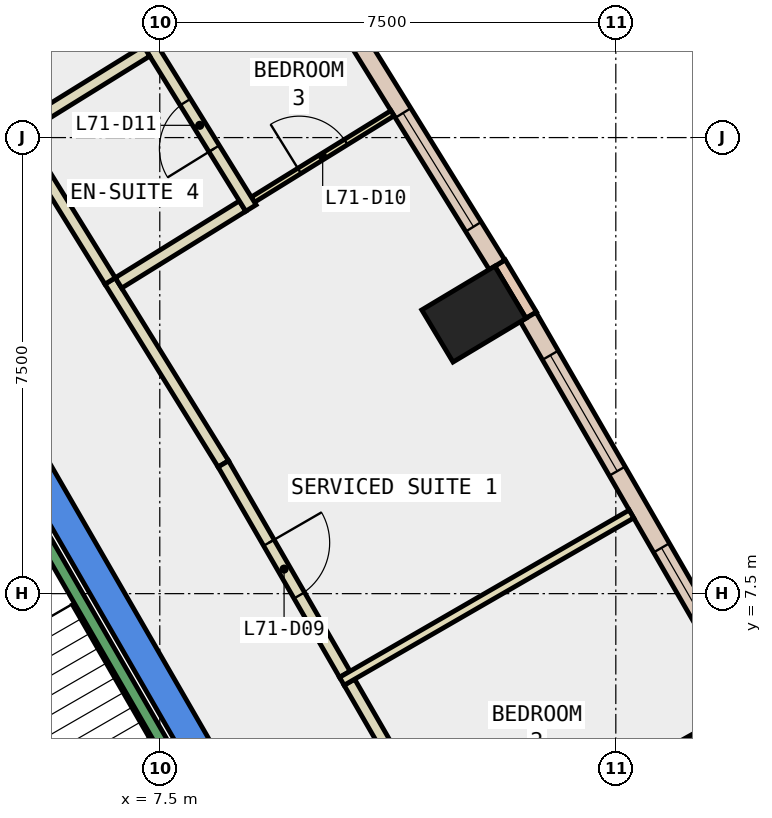
"""IFC4 building model, lengths in metres.
Left out: names, types, materials, properties, quantities, classifications, styles, units other than length and angle.
Written with IfcOpenShell. Run it as: python <this file> out.ifc"""

import sys

from ifc_helpers import new_model, si_unit, direction, frame, frame_2d, origin, origin_2d, place, context, subcontext, project, spatial, polyline, rectangle, outline, extrude, element, fill, save


model = new_model("IFC4")
c1 = context("Model", 3, precision=1e-05, world=origin(), true_north=direction((0.0, 1.0)))
c2 = subcontext(c1, "Body", "Model", "MODEL_VIEW")
j1 = project(units=[si_unit("LENGTHUNIT", "METRE"), si_unit("PLANEANGLEUNIT", "RADIAN")], contexts=[c1])
p1 = place(None, origin())
s1 = spatial("IfcSite", under=j1, at=p1, CompositionType="ELEMENT")
p2 = place(p1, origin())
s2 = spatial("IfcBuilding", under=s1, at=p2, CompositionType="ELEMENT")
p3 = place(p2, frame((0.0, 0.0, 304.4)))
s3 = spatial("IfcBuildingStorey", under=s2, at=p3, CompositionType="ELEMENT", Elevation=304.4)
for number, where, z_axis, x_axis in (
    (1, (16.809, 4.921, -0.34), (0.0, 0.0, 1.0), (-0.486, 0.874, 0.0)),
    (2, (12.666, 12.097, -0.34), (0.0, 0.0, 1.0), (-0.514, 0.858, 0.0)),
):
    element("IfcColumn", number, at=place(p3, frame(where, z_axis=z_axis, x_axis=x_axis)), inside=s3, PredefinedType="COLUMN", context=c2, shape_type="SweptSolid", body=[
        extrude(rectangle(XDim=1.0, YDim=1.4, at=origin_2d()), origin(), (0.0, 0.0, 1.0), 3.6),
    ])
p4 = place(p3, frame((0.0, 0.0, -0.34)))
e3 = element("IfcWall", 3, at=p4, inside=s3, PredefinedType="SHEAR", context=c2, shape_type="SweptSolid", body=[
    extrude(outline(polyline([(5.486, 9.998), (5.053, 9.748), (9.238, 2.5), (9.815, 2.5), (5.486, 9.998)])), origin(), (0.0, 0.0, 1.0), 3.6),
])
p5 = place(p3, frame((13.609, 12.08, 0.0), z_axis=(0.0, 0.0, 1.0), x_axis=(-0.513885310016, 0.857858897576, 0.0)))
e4 = element("IfcWall", 4, at=p5, inside=s3, PredefinedType="STANDARD", context=c2, shape_type="SweptSolid", body=[
    extrude(rectangle(XDim=1.0, YDim=0.2, at=frame_2d((0.5, 0.0))), origin(), (0.0, 0.0, 1.0), 3.26),
])
p6 = place(p3, frame((17.215, 5.717, 0.0), z_axis=(0.0, 0.0, 1.0), x_axis=(-0.499905472729, 0.866079972252, 0.0)))
e5 = element("IfcWall", 5, at=p6, inside=s3, PredefinedType="STANDARD", context=c2, shape_type="SweptSolid", body=[
    extrude(rectangle(XDim=7.313, YDim=0.3, at=frame_2d((3.657, 0.0))), origin(), (0.0, 0.0, 1.0), 3.26),
])
p7 = place(p6, frame((0.728, 0.0, 0.9)))
e6 = element("IfcOpeningElement", 6, at=p7, cuts=e5, PredefinedType="OPENING", context=c2, shape_type="SweptSolid", body=[
    extrude(rectangle(XDim=2.2, YDim=2.0, at=frame_2d((1.1, 1.0))), frame((0.0, 0.16, 0.0), z_axis=(0.0, -1.0, 0.0), x_axis=(1.0, 0.0, 0.0)), (0.0, 0.0, 1.0), 0.32),
])
p8 = place(p6, frame((4.385, 0.0, 0.9)))
e7 = element("IfcOpeningElement", 7, at=p8, cuts=e5, PredefinedType="OPENING", context=c2, shape_type="SweptSolid", body=[
    extrude(rectangle(XDim=2.2, YDim=2.0, at=frame_2d((1.1, 1.0))), frame((0.0, 0.16, 0.0), z_axis=(0.0, -1.0, 0.0), x_axis=(1.0, 0.0, 0.0)), (0.0, 0.0, 1.0), 0.32),
])
p9 = place(p3, frame((13.047, 12.907, 0.0), z_axis=(0.0, 0.0, 1.0), x_axis=(-0.526409529565, 0.850231149267, 0.0)))
e8 = element("IfcWall", 8, at=p9, inside=s3, PredefinedType="STANDARD", context=c2, shape_type="SweptSolid", body=[
    extrude(rectangle(XDim=7.346, YDim=0.3, at=frame_2d((3.673, 0.0))), origin(), (0.0, 0.0, 1.0), 3.26),
])
p10 = place(p9, frame((0.737, 0.0, 0.9)))
e9 = element("IfcOpeningElement", 9, at=p10, cuts=e8, PredefinedType="OPENING", context=c2, shape_type="SweptSolid", body=[
    extrude(rectangle(XDim=2.2, YDim=2.0, at=frame_2d((1.1, 1.0))), frame((0.0, 0.16, 0.0), z_axis=(0.0, -1.0, 0.0), x_axis=(1.0, 0.0, 0.0)), (0.0, 0.0, 1.0), 0.32),
])
p11 = place(p9, frame((4.41, 0.0, 0.9)))
e10 = element("IfcOpeningElement", 10, at=p11, cuts=e8, PredefinedType="OPENING", context=c2, shape_type="SweptSolid", body=[
    extrude(rectangle(XDim=2.2, YDim=2.0, at=frame_2d((1.1, 1.0))), frame((0.0, 0.16, 0.0), z_axis=(0.0, -1.0, 0.0), x_axis=(1.0, 0.0, 0.0)), (0.0, 0.0, 1.0), 0.32),
])
p12 = place(p3, frame((10.618, 6.044, 0.0), z_axis=(0.0, 0.0, 1.0), x_axis=(0.50008212199, -0.86597798544, 0.0)))
e11 = element("IfcWall", 11, at=p12, inside=s3, PredefinedType="PARTITIONING", context=c2, shape_type="SweptSolid", body=[
    extrude(rectangle(XDim=3.995, YDim=0.2, at=frame_2d((1.998, 0.0))), origin(), (0.0, 0.0, 1.0), 3.26),
])
p13 = place(p3, frame((6.683, 12.642, 0.0), z_axis=(0.0, 0.0, 1.0), x_axis=(0.526290465295, -0.850304854825, 0.0)))
e12 = element("IfcWall", 12, at=p13, inside=s3, PredefinedType="PARTITIONING", context=c2, shape_type="SweptSolid", body=[
    extrude(rectangle(XDim=3.538, YDim=0.2, at=frame_2d((1.769, 0.0))), origin(), (0.0, 0.0, 1.0), 3.26),
])
p14 = place(p3, frame((8.545, 9.634, 0.0), z_axis=(0.0, 0.0, 1.0), x_axis=(0.50008212199, -0.86597798544, 0.0)))
e13 = element("IfcWall", 13, at=p14, inside=s3, PredefinedType="PARTITIONING", context=c2, shape_type="SweptSolid", body=[
    extrude(rectangle(XDim=3.995, YDim=0.2, at=frame_2d((1.998, 0.0))), origin(), (0.0, 0.0, 1.0), 3.26),
])
p15 = place(p14, frame((1.498, 0.0, 0.0)))
e14 = element("IfcOpeningElement", 14, at=p15, cuts=e13, PredefinedType="OPENING", context=c2, shape_type="SweptSolid", body=[
    extrude(rectangle(XDim=1.0, YDim=2.1, at=frame_2d((0.5, 1.05))), frame((0.0, 0.11, 0.0), z_axis=(0.0, -1.0, 0.0), x_axis=(1.0, 0.0, 0.0)), (0.0, 0.0, 1.0), 0.22),
])
p16 = place(p3, frame((5.104, 15.193, 0.0), z_axis=(0.0, 0.0, 1.0), x_axis=(0.526329401671, -0.850280754184, 0.0)))
e15 = element("IfcWall", 15, at=p16, inside=s3, PredefinedType="PARTITIONING", context=c2, shape_type="SweptSolid", body=[
    extrude(rectangle(XDim=3.0, YDim=0.2, at=frame_2d((1.5, 0.0))), origin(), (0.0, 0.0, 1.0), 3.26),
])
p17 = place(p3, frame((10.494, 6.059, 0.0), z_axis=(0.0, 0.0, 1.0), x_axis=(0.866027397988, 0.499996545922, 0.0)))
e16 = element("IfcWall", 16, at=p17, inside=s3, PredefinedType="PARTITIONING", context=c2, shape_type="SweptSolid", body=[
    extrude(rectangle(XDim=5.5, YDim=0.15, at=frame_2d((2.75, 0.0))), origin(), (0.0, 0.0, 1.0), 3.26),
])
p18 = place(p3, frame((9.031, 13.979, 0.0), z_axis=(0.0, 0.0, 1.0), x_axis=(0.85032680557, 0.526254998768, 0.0)))
e17 = element("IfcWall", 17, at=p18, inside=s3, PredefinedType="PARTITIONING", context=c2, shape_type="SweptSolid", body=[
    extrude(rectangle(XDim=2.7, YDim=0.1, at=frame_2d((1.35, 0.0))), origin(), (0.0, 0.0, 1.0), 3.26),
])
p19 = place(p18, frame((0.9, 0.0, 0.0)))
e18 = element("IfcOpeningElement", 18, at=p19, cuts=e17, PredefinedType="OPENING", context=c2, shape_type="SweptSolid", body=[
    extrude(rectangle(XDim=0.9, YDim=2.1, at=frame_2d((0.45, 1.05))), frame((0.0, 0.06, 0.0), z_axis=(0.0, -1.0, 0.0), x_axis=(1.0, 0.0, 0.0)), (0.0, 0.0, 1.0), 0.12),
])
p20 = place(p3, frame((6.821, 12.61, 0.0), z_axis=(0.0, 0.0, 1.0), x_axis=(0.850254303895, 0.526372129494, 0.0)))
e19 = element("IfcWall", 19, at=p20, inside=s3, PredefinedType="PARTITIONING", context=c2, shape_type="SweptSolid", body=[
    extrude(rectangle(XDim=2.399, YDim=0.2, at=frame_2d((1.2, 0.0))), origin(), (0.0, 0.0, 1.0), 3.26),
])
p21 = place(p3, frame((8.999, 13.841, 0.0), z_axis=(0.0, 0.0, 1.0), x_axis=(-0.526283695852, 0.850309044689, 0.0)))
e20 = element("IfcWall", 20, at=p21, inside=s3, PredefinedType="PARTITIONING", context=c2, shape_type="SweptSolid", body=[
    extrude(rectangle(XDim=3.2, YDim=0.2, at=frame_2d((1.6, 0.0))), origin(), (0.0, 0.0, 1.0), 3.26),
])
p22 = place(p21, frame((1.15, 0.0, 0.0)))
e21 = element("IfcOpeningElement", 21, at=p22, cuts=e20, PredefinedType="OPENING", context=c2, shape_type="SweptSolid", body=[
    extrude(rectangle(XDim=0.9, YDim=2.1, at=frame_2d((0.45, 1.05))), frame((0.0, 0.11, 0.0), z_axis=(0.0, -1.0, 0.0), x_axis=(1.0, 0.0, 0.0)), (0.0, 0.0, 1.0), 0.22),
])
p23 = place(p3, frame((7.282, 16.424, 0.0), z_axis=(0.0, 0.0, 1.0), x_axis=(-0.850142312258, -0.526552987751, 0.0)))
e22 = element("IfcWall", 22, at=p23, inside=s3, PredefinedType="PARTITIONING", context=c2, shape_type="SweptSolid", body=[
    extrude(rectangle(XDim=2.5, YDim=0.2, at=frame_2d((1.25, 0.0))), origin(), (0.0, 0.0, 1.0), 3.26),
])
p24 = place(p3, frame((4.445, 16.068, 0.0), z_axis=(0.0, 0.0, 1.0), x_axis=(0.785872006963, 0.618389188677, 0.0)))
e23 = element("IfcWall", 23, at=p24, inside=s3, PredefinedType="PARTITIONING", context=c2, shape_type="SweptSolid", body=[
    extrude(rectangle(XDim=4.216, YDim=0.15, at=frame_2d((2.108, 0.0))), origin(), (0.0, 0.0, 1.0), 3.26),
])
p25 = place(p3, frame((8.48, 3.412, 0.0), z_axis=(0.0, 0.0, 1.0), x_axis=(-0.499978703459, 0.866037698999, 0.0)))
e24 = element("IfcWall", 24, at=p25, inside=s3, PredefinedType="STANDARD", context=c2, shape_type="SweptSolid", body=[
    extrude(rectangle(XDim=6.9, YDim=0.2, at=frame_2d((3.45, 0.0))), origin(), (0.0, 0.0, 1.0), 3.26),
])
p26 = place(p7, origin())
e25 = element("IfcWindow", 25, at=p26, inside=s3, PartitioningType="SINGLE_PANEL", PredefinedType="WINDOW", context=c2, shape_type="SweptSolid", body=[
    extrude(rectangle(XDim=2.2, YDim=2.0, at=frame_2d((1.1, 1.0))), frame((0.0, 0.03, 0.0), z_axis=(0.0, -1.0, 0.0), x_axis=(1.0, 0.0, 0.0)), (0.0, 0.0, 1.0), 0.06),
])
fill(e6, e25)
p27 = place(p8, origin())
e26 = element("IfcWindow", 26, at=p27, inside=s3, PartitioningType="SINGLE_PANEL", PredefinedType="WINDOW", context=c2, shape_type="SweptSolid", body=[
    extrude(rectangle(XDim=2.2, YDim=2.0, at=frame_2d((1.1, 1.0))), frame((0.0, 0.03, 0.0), z_axis=(0.0, -1.0, 0.0), x_axis=(1.0, 0.0, 0.0)), (0.0, 0.0, 1.0), 0.06),
])
fill(e7, e26)
p28 = place(p10, origin())
e27 = element("IfcWindow", 27, at=p28, inside=s3, PartitioningType="SINGLE_PANEL", PredefinedType="WINDOW", context=c2, shape_type="SweptSolid", body=[
    extrude(rectangle(XDim=2.2, YDim=2.0, at=frame_2d((1.1, 1.0))), frame((0.0, 0.03, 0.0), z_axis=(0.0, -1.0, 0.0), x_axis=(1.0, 0.0, 0.0)), (0.0, 0.0, 1.0), 0.06),
])
fill(e9, e27)
p29 = place(p15, origin())
e28 = element("IfcDoor", 28, at=p29, inside=s3, OperationType="SINGLE_SWING_LEFT", PredefinedType="DOOR", context=c2, shape_type="SweptSolid", body=[
    extrude(rectangle(XDim=1.0, YDim=2.1, at=frame_2d((0.5, 1.05))), frame((0.0, 0.025, 0.0), z_axis=(0.0, -1.0, 0.0), x_axis=(1.0, 0.0, 0.0)), (0.0, 0.0, 1.0), 0.05),
])
fill(e14, e28)
p30 = place(p19, origin())
e29 = element("IfcDoor", 29, at=p30, inside=s3, OperationType="SINGLE_SWING_LEFT", PredefinedType="DOOR", context=c2, shape_type="SweptSolid", body=[
    extrude(rectangle(XDim=0.9, YDim=2.1, at=frame_2d((0.45, 1.05))), frame((0.0, 0.025, 0.0), z_axis=(0.0, -1.0, 0.0), x_axis=(1.0, 0.0, 0.0)), (0.0, 0.0, 1.0), 0.05),
])
fill(e18, e29)
p31 = place(p22, origin())
e30 = element("IfcDoor", 30, at=p31, inside=s3, OperationType="SINGLE_SWING_RIGHT", PredefinedType="DOOR", context=c2, shape_type="SweptSolid", body=[
    extrude(rectangle(XDim=0.9, YDim=2.1, at=frame_2d((0.45, 1.05))), frame((0.0, 0.025, 0.0), z_axis=(0.0, -1.0, 0.0), x_axis=(1.0, 0.0, 0.0)), (0.0, 0.0, 1.0), 0.05),
])
fill(e21, e30)
save(model, sys.argv[1])
